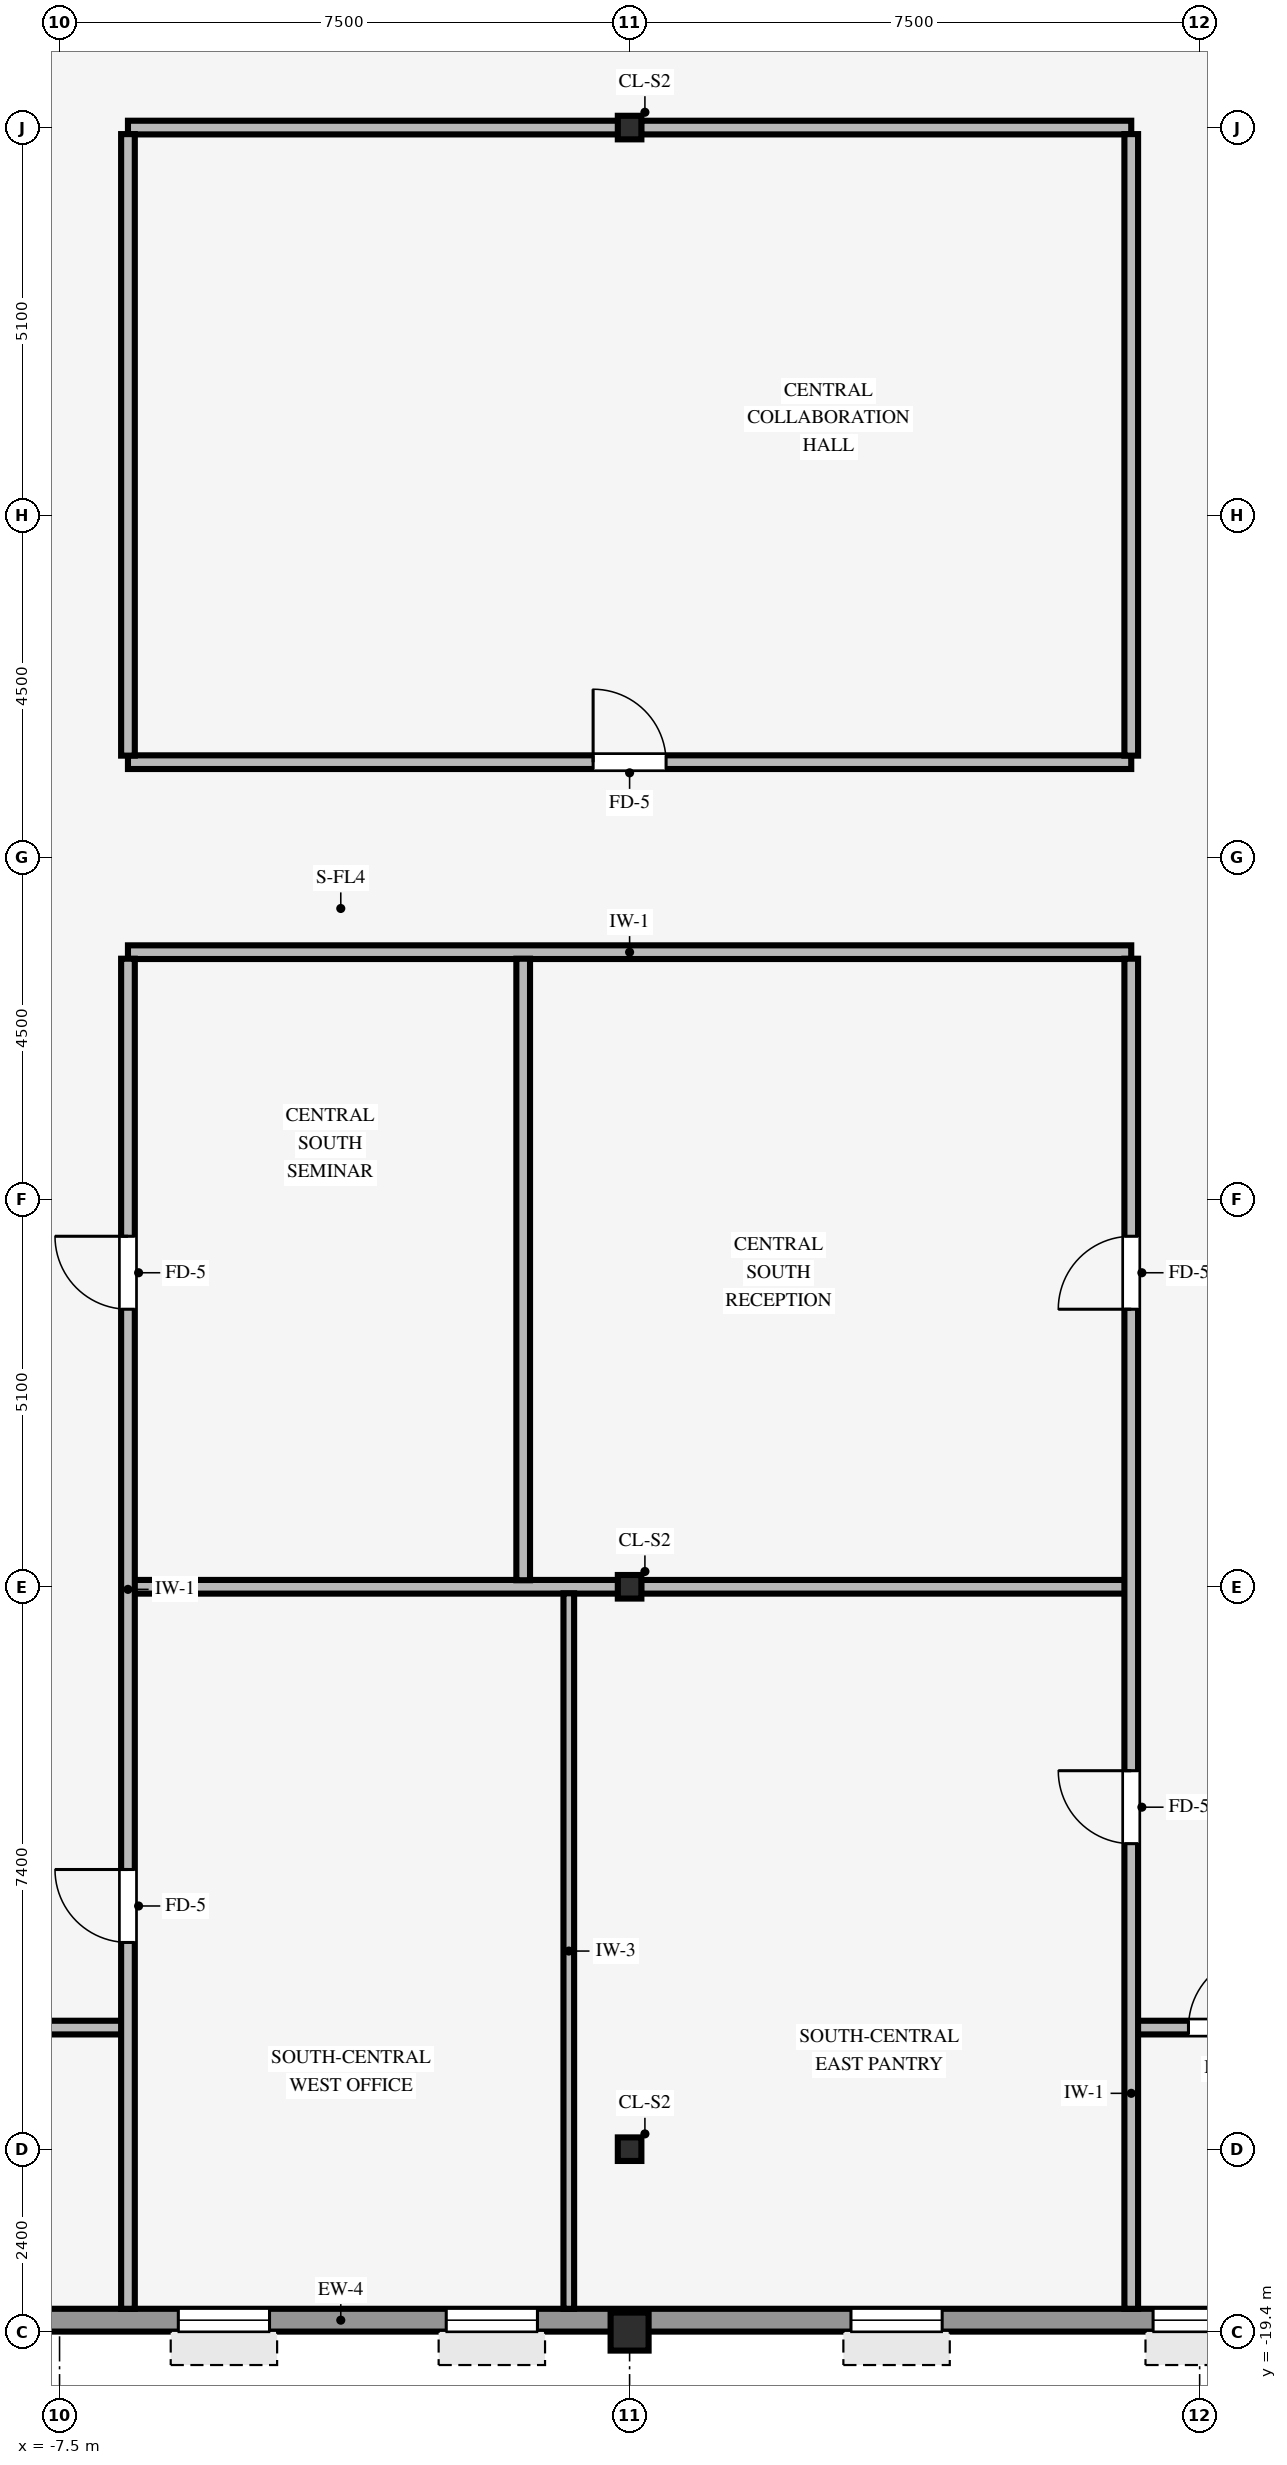
"""IFC4 building model, lengths in metres.
Left out: names, types, materials, properties, quantities, classifications, styles, units other than length and angle.
Written with IfcOpenShell. Run it as: python <this file> out.ifc"""

import sys

from ifc_helpers import new_model, si_unit, direction, frame, frame_2d, origin, origin_2d, place, context, subcontext, project, spatial, rectangle, hollow_rectangle, i_section, extrude, source, transform, mapped, element, fill, save


model = new_model("IFC4")
c1 = context("Model", 3, precision=1e-05, world=origin(), true_north=direction((0.0, 1.0)))
c2 = subcontext(c1, "Body", "Model", "MODEL_VIEW")
j1 = project(units=[si_unit("LENGTHUNIT", "METRE"), si_unit("PLANEANGLEUNIT", "RADIAN")], contexts=[c1])
p1 = place(None, origin())
s1 = spatial("IfcSite", under=j1, at=p1, CompositionType="ELEMENT")
p2 = place(p1, origin())
s2 = spatial("IfcBuilding", under=s1, at=p2, CompositionType="ELEMENT")
p3 = place(p2, frame((0.0, 0.0, 242.0)))
s3 = spatial("IfcBuildingStorey", under=s2, at=p3, CompositionType="ELEMENT", Elevation=242.0)
p4 = place(p3, frame((0.0, -19.4, 0.0), z_axis=(0.0, 0.0, 1.0), x_axis=(1.0, 0.0, 0.0)))
e1 = element("IfcColumn", 1, at=p4, inside=s3, PredefinedType="COLUMN", context=c2, shape_type="SweptSolid", body=[
    extrude(hollow_rectangle(XDim=0.5, YDim=0.5, WallThickness=0.032, InnerFilletRadius=0.032, OuterFilletRadius=0.064, at=origin_2d()), origin(), (0.0, 0.0, 1.0), 3.25),
])
for number, where, z_axis, x_axis in (
    (2, (0.0, -17.0, 0.0), (0.0, 0.0, 1.0), (1.0, 0.0, 0.0)),
    (3, (0.0, -9.6, 0.0), (0.0, 0.0, 1.0), (1.0, 0.0, 0.0)),
    (4, (0.0, 9.6, 0.0), (0.0, 0.0, 1.0), (1.0, 0.0, 0.0)),
):
    element("IfcColumn", number, at=place(p3, frame(where, z_axis=z_axis, x_axis=x_axis)), inside=s3, PredefinedType="COLUMN", context=c2, shape_type="SweptSolid", body=[
        extrude(i_section(OverallWidth=0.31, OverallDepth=0.31, WebThickness=0.015, FlangeThickness=0.015, FilletRadius=0.015, at=origin_2d()), origin(), (0.0, 0.0, 1.0), 3.25),
    ])
p5 = place(p3, frame((-24.3, -19.25, 0.0), z_axis=(0.0, 0.0, 1.0), x_axis=(1.0, 0.0, 0.0)))
e5 = element("IfcWall", 5, at=p5, inside=s3, PredefinedType="STANDARD", context=c2, shape_type="SweptSolid", body=[
    extrude(rectangle(XDim=41.0, YDim=0.3, at=frame_2d((20.5, 0.0))), origin(), (0.0, 0.0, 1.0), 2.585),
])
p6 = place(p5, frame((2.837, 0.0, 0.8)))
e6 = element("IfcOpeningElement", 6, at=p6, cuts=e5, PredefinedType="OPENING", context=c2, shape_type="SweptSolid", body=[
    extrude(rectangle(XDim=1.2, YDim=1.48, at=frame_2d((0.6, 0.74))), frame((0.0, 0.16, 0.0), z_axis=(0.0, -1.0, 0.0), x_axis=(1.0, 0.0, 0.0)), (0.0, 0.0, 1.0), 0.32),
])
p7 = place(p5, frame((7.712, 0.0, 0.8)))
e7 = element("IfcOpeningElement", 7, at=p7, cuts=e5, PredefinedType="OPENING", context=c2, shape_type="SweptSolid", body=[
    extrude(rectangle(XDim=1.2, YDim=1.48, at=frame_2d((0.6, 0.74))), frame((0.0, 0.16, 0.0), z_axis=(0.0, -1.0, 0.0), x_axis=(1.0, 0.0, 0.0)), (0.0, 0.0, 1.0), 0.32),
])
p8 = place(p5, frame((12.587, 0.0, 0.8)))
e8 = element("IfcOpeningElement", 8, at=p8, cuts=e5, PredefinedType="OPENING", context=c2, shape_type="SweptSolid", body=[
    extrude(rectangle(XDim=1.2, YDim=1.48, at=frame_2d((0.6, 0.74))), frame((0.0, 0.16, 0.0), z_axis=(0.0, -1.0, 0.0), x_axis=(1.0, 0.0, 0.0)), (0.0, 0.0, 1.0), 0.32),
])
p9 = place(p5, frame((18.363, 0.0, 0.8)))
e9 = element("IfcOpeningElement", 9, at=p9, cuts=e5, PredefinedType="OPENING", context=c2, shape_type="SweptSolid", body=[
    extrude(rectangle(XDim=1.2, YDim=1.48, at=frame_2d((0.6, 0.74))), frame((0.0, 0.16, 0.0), z_axis=(0.0, -1.0, 0.0), x_axis=(1.0, 0.0, 0.0)), (0.0, 0.0, 1.0), 0.32),
])
p10 = place(p5, frame((21.887, 0.0, 0.8)))
e10 = element("IfcOpeningElement", 10, at=p10, cuts=e5, PredefinedType="OPENING", context=c2, shape_type="SweptSolid", body=[
    extrude(rectangle(XDim=1.2, YDim=1.48, at=frame_2d((0.6, 0.74))), frame((0.0, 0.16, 0.0), z_axis=(0.0, -1.0, 0.0), x_axis=(1.0, 0.0, 0.0)), (0.0, 0.0, 1.0), 0.32),
])
p11 = place(p5, frame((27.212, 0.0, 0.8)))
e11 = element("IfcOpeningElement", 11, at=p11, cuts=e5, PredefinedType="OPENING", context=c2, shape_type="SweptSolid", body=[
    extrude(rectangle(XDim=1.2, YDim=1.48, at=frame_2d((0.6, 0.74))), frame((0.0, 0.16, 0.0), z_axis=(0.0, -1.0, 0.0), x_axis=(1.0, 0.0, 0.0)), (0.0, 0.0, 1.0), 0.32),
])
p12 = place(p5, frame((31.188, 0.0, 0.8)))
e12 = element("IfcOpeningElement", 12, at=p12, cuts=e5, PredefinedType="OPENING", context=c2, shape_type="SweptSolid", body=[
    extrude(rectangle(XDim=1.2, YDim=1.48, at=frame_2d((0.6, 0.74))), frame((0.0, 0.16, 0.0), z_axis=(0.0, -1.0, 0.0), x_axis=(1.0, 0.0, 0.0)), (0.0, 0.0, 1.0), 0.32),
])
p13 = place(p5, frame((36.962, 0.0, 0.8)))
e13 = element("IfcOpeningElement", 13, at=p13, cuts=e5, PredefinedType="OPENING", context=c2, shape_type="SweptSolid", body=[
    extrude(rectangle(XDim=1.2, YDim=1.48, at=frame_2d((0.6, 0.74))), frame((0.0, 0.16, 0.0), z_axis=(0.0, -1.0, 0.0), x_axis=(1.0, 0.0, 0.0)), (0.0, 0.0, 1.0), 0.32),
])
p14 = place(p3, frame((-9.0, -15.4, 0.0), z_axis=(0.0, 0.0, 1.0), x_axis=(1.0, 0.0, 0.0)))
e14 = element("IfcWall", 14, at=p14, inside=s3, PredefinedType="PARTITIONING", context=c2, shape_type="SweptSolid", body=[
    extrude(rectangle(XDim=2.339, YDim=0.18, at=frame_2d((1.169, 0.0))), origin(), (0.0, 0.0, 1.0), 3.24),
])
p15 = place(p3, frame((6.666, -15.4, 0.0), z_axis=(0.0, 0.0, 1.0), x_axis=(1.0, 0.0, 0.0)))
e15 = element("IfcWall", 15, at=p15, inside=s3, PredefinedType="PARTITIONING", context=c2, shape_type="SweptSolid", body=[
    extrude(rectangle(XDim=11.834, YDim=0.18, at=frame_2d((5.917, 0.0))), origin(), (0.0, 0.0, 1.0), 3.24),
])
p16 = place(p15, frame((0.687, 0.0, 0.0)))
e16 = element("IfcOpeningElement", 16, at=p16, cuts=e15, PredefinedType="OPENING", context=c2, shape_type="SweptSolid", body=[
    extrude(rectangle(XDim=0.96, YDim=2.1, at=frame_2d((0.48, 1.05))), frame((0.0, 0.1, 0.0), z_axis=(0.0, -1.0, 0.0), x_axis=(1.0, 0.0, 0.0)), (0.0, 0.0, 1.0), 0.2),
])
p17 = place(p3, frame((-6.539, -9.6, 0.0), z_axis=(0.0, 0.0, 1.0), x_axis=(1.0, 0.0, 0.0)))
e17 = element("IfcWall", 17, at=p17, inside=s3, PredefinedType="PARTITIONING", context=c2, shape_type="SweptSolid", body=[
    extrude(rectangle(XDim=6.388, YDim=0.18, at=frame_2d((3.194, 0.0))), origin(), (0.0, 0.0, 1.0), 2.285),
])
p18 = place(p3, frame((0.151, -9.6, 0.0), z_axis=(0.0, 0.0, 1.0), x_axis=(1.0, 0.0, 0.0)))
e18 = element("IfcWall", 18, at=p18, inside=s3, PredefinedType="PARTITIONING", context=c2, shape_type="SweptSolid", body=[
    extrude(rectangle(XDim=6.383, YDim=0.18, at=frame_2d((3.191, 0.0))), origin(), (0.0, 0.0, 1.0), 2.285),
])
p19 = place(p3, frame((-6.6, -1.25, 0.0), z_axis=(0.0, 0.0, 1.0), x_axis=(1.0, 0.0, 0.0)))
e19 = element("IfcWall", 19, at=p19, inside=s3, PredefinedType="PARTITIONING", context=c2, shape_type="SweptSolid", body=[
    extrude(rectangle(XDim=13.2, YDim=0.18, at=frame_2d((6.6, 0.0))), origin(), (0.0, 0.0, 1.0), 3.24),
])
p20 = place(p3, frame((-6.6, 1.25, 0.0), z_axis=(0.0, 0.0, 1.0), x_axis=(1.0, 0.0, 0.0)))
e20 = element("IfcWall", 20, at=p20, inside=s3, PredefinedType="PARTITIONING", context=c2, shape_type="SweptSolid", body=[
    extrude(rectangle(XDim=13.2, YDim=0.18, at=frame_2d((6.6, 0.0))), origin(), (0.0, 0.0, 1.0), 3.24),
])
p21 = place(p20, frame((6.12, 0.0, 0.0)))
e21 = element("IfcOpeningElement", 21, at=p21, cuts=e20, PredefinedType="OPENING", context=c2, shape_type="SweptSolid", body=[
    extrude(rectangle(XDim=0.96, YDim=2.1, at=frame_2d((0.48, 1.05))), frame((0.0, 0.1, 0.0), z_axis=(0.0, -1.0, 0.0), x_axis=(1.0, 0.0, 0.0)), (0.0, 0.0, 1.0), 0.2),
])
for number, where, z_axis, x_axis in (
    (22, (-6.6, 9.6, 0.0), (0.0, 0.0, 1.0), (1.0, 0.0, 0.0)),
    (23, (0.151, 9.6, 0.0), (0.0, 0.0, 1.0), (1.0, 0.0, 0.0)),
):
    element("IfcWall", number, at=place(p3, frame(where, z_axis=z_axis, x_axis=x_axis)), inside=s3, PredefinedType="PARTITIONING", context=c2, shape_type="SweptSolid", body=[
        extrude(rectangle(XDim=6.449, YDim=0.18, at=frame_2d((3.225, 0.0))), origin(), (0.0, 0.0, 1.0), 2.285),
    ])
p22 = place(p3, frame((-6.6, -19.1, 0.0), z_axis=(0.0, 0.0, 1.0), x_axis=(0.0, 1.0, 0.0)))
e24 = element("IfcWall", 24, at=p22, inside=s3, PredefinedType="PARTITIONING", context=c2, shape_type="SweptSolid", body=[
    extrude(rectangle(XDim=17.764, YDim=0.18, at=frame_2d((8.882, 0.0))), origin(), (0.0, 0.0, 1.0), 3.24),
])
p23 = place(p22, frame((13.152, 0.0, 0.0)))
e25 = element("IfcOpeningElement", 25, at=p23, cuts=e24, PredefinedType="OPENING", context=c2, shape_type="SweptSolid", body=[
    extrude(rectangle(XDim=0.96, YDim=2.1, at=frame_2d((0.48, 1.05))), frame((0.0, 0.1, 0.0), z_axis=(0.0, -1.0, 0.0), x_axis=(1.0, 0.0, 0.0)), (0.0, 0.0, 1.0), 0.2),
])
p24 = place(p22, frame((4.82, 0.0, 0.0)))
e26 = element("IfcOpeningElement", 26, at=p24, cuts=e24, PredefinedType="OPENING", context=c2, shape_type="SweptSolid", body=[
    extrude(rectangle(XDim=0.96, YDim=2.1, at=frame_2d((0.48, 1.05))), frame((0.0, 0.1, 0.0), z_axis=(0.0, -1.0, 0.0), x_axis=(1.0, 0.0, 0.0)), (0.0, 0.0, 1.0), 0.2),
])
for number, where, z_axis, x_axis in (
    (27, (-6.6, 1.336, 0.0), (0.0, 0.0, 1.0), (0.0, 1.0, 0.0)),
    (28, (-1.4, -9.514, 0.0), (0.0, 0.0, 1.0), (0.0, 1.0, 0.0)),
):
    element("IfcWall", number, at=place(p3, frame(where, z_axis=z_axis, x_axis=x_axis)), inside=s3, PredefinedType="PARTITIONING", context=c2, shape_type="SweptSolid", body=[
        extrude(rectangle(XDim=8.178, YDim=0.18, at=frame_2d((4.089, 0.0))), origin(), (0.0, 0.0, 1.0), 3.24),
    ])
p25 = place(p3, frame((-0.8, -19.1, 0.0), z_axis=(0.0, 0.0, 1.0), x_axis=(0.0, 1.0, 0.0)))
e29 = element("IfcWall", 29, at=p25, inside=s3, PredefinedType="PARTITIONING", context=c2, shape_type="SweptSolid", body=[
    extrude(rectangle(XDim=9.414, YDim=0.14, at=frame_2d((4.707, 0.0))), origin(), (0.0, 0.0, 1.0), 3.24),
])
p26 = place(p3, frame((6.6, -19.1, 0.0), z_axis=(0.0, 0.0, 1.0), x_axis=(0.0, 1.0, 0.0)))
e30 = element("IfcWall", 30, at=p26, inside=s3, PredefinedType="PARTITIONING", context=c2, shape_type="SweptSolid", body=[
    extrude(rectangle(XDim=17.764, YDim=0.18, at=frame_2d((8.882, 0.0))), origin(), (0.0, 0.0, 1.0), 3.24),
])
p27 = place(p26, frame((13.152, 0.0, 0.0)))
e31 = element("IfcOpeningElement", 31, at=p27, cuts=e30, PredefinedType="OPENING", context=c2, shape_type="SweptSolid", body=[
    extrude(rectangle(XDim=0.96, YDim=2.1, at=frame_2d((0.48, 1.05))), frame((0.0, 0.1, 0.0), z_axis=(0.0, -1.0, 0.0), x_axis=(1.0, 0.0, 0.0)), (0.0, 0.0, 1.0), 0.2),
])
p28 = place(p26, frame((6.12, 0.0, 0.0)))
e32 = element("IfcOpeningElement", 32, at=p28, cuts=e30, PredefinedType="OPENING", context=c2, shape_type="SweptSolid", body=[
    extrude(rectangle(XDim=0.96, YDim=2.1, at=frame_2d((0.48, 1.05))), frame((0.0, 0.1, 0.0), z_axis=(0.0, -1.0, 0.0), x_axis=(1.0, 0.0, 0.0)), (0.0, 0.0, 1.0), 0.2),
])
p29 = place(p3, frame((6.6, 1.336, 0.0), z_axis=(0.0, 0.0, 1.0), x_axis=(0.0, 1.0, 0.0)))
e33 = element("IfcWall", 33, at=p29, inside=s3, PredefinedType="PARTITIONING", context=c2, shape_type="SweptSolid", body=[
    extrude(rectangle(XDim=8.178, YDim=0.18, at=frame_2d((4.089, 0.0))), origin(), (0.0, 0.0, 1.0), 3.24),
])
m1 = source(origin(), c2, "Body", "SweptSolid", [
    extrude(rectangle(XDim=1.2, YDim=1.48, at=frame_2d((0.6, 0.74))), frame((0.0, 0.03, 0.0), z_axis=(0.0, -1.0, 0.0), x_axis=(1.0, 0.0, 0.0)), (0.0, 0.0, 1.0), 0.06),
])
p30 = place(p9, origin())
e34 = element("IfcWindow", 34, at=p30, inside=s3, PartitioningType="SINGLE_PANEL", PredefinedType="WINDOW", context=c2, shape_type="MappedRepresentation", body=[
    mapped(m1, transform((0.0, 0.0, 0.0), scale=1.0)),
])
fill(e9, e34)
p31 = place(p10, origin())
e35 = element("IfcWindow", 35, at=p31, inside=s3, PartitioningType="SINGLE_PANEL", PredefinedType="WINDOW", context=c2, shape_type="MappedRepresentation", body=[
    mapped(m1, transform((0.0, 0.0, 0.0), scale=1.0)),
])
fill(e10, e35)
p32 = place(p11, origin())
e36 = element("IfcWindow", 36, at=p32, inside=s3, PartitioningType="SINGLE_PANEL", PredefinedType="WINDOW", context=c2, shape_type="MappedRepresentation", body=[
    mapped(m1, transform((0.0, 0.0, 0.0), scale=1.0)),
])
fill(e11, e36)
p33 = place(p12, origin())
e37 = element("IfcWindow", 37, at=p33, inside=s3, PartitioningType="SINGLE_PANEL", PredefinedType="WINDOW", context=c2, shape_type="MappedRepresentation", body=[
    mapped(m1, transform((0.0, 0.0, 0.0), scale=1.0)),
])
fill(e12, e37)
m2 = source(origin(), c2, "Body", "SweptSolid", [
    extrude(rectangle(XDim=0.96, YDim=2.1, at=frame_2d((0.48, 1.05))), frame((0.0, 0.025, 0.0), z_axis=(0.0, -1.0, 0.0), x_axis=(1.0, 0.0, 0.0)), (0.0, 0.0, 1.0), 0.05),
])
p34 = place(p21, origin())
e38 = element("IfcDoor", 38, at=p34, inside=s3, OperationType="SINGLE_SWING_LEFT", PredefinedType="DOOR", context=c2, shape_type="MappedRepresentation", body=[
    mapped(m2, transform((0.0, 0.0, 0.0), scale=1.0)),
])
fill(e21, e38)
p35 = place(p23, origin())
e39 = element("IfcDoor", 39, at=p35, inside=s3, OperationType="SINGLE_SWING_RIGHT", PredefinedType="DOOR", context=c2, shape_type="MappedRepresentation", body=[
    mapped(m2, transform((0.0, 0.0, 0.0), scale=1.0)),
])
fill(e25, e39)
p36 = place(p27, origin())
e40 = element("IfcDoor", 40, at=p36, inside=s3, OperationType="SINGLE_SWING_LEFT", PredefinedType="DOOR", context=c2, shape_type="MappedRepresentation", body=[
    mapped(m2, transform((0.0, 0.0, 0.0), scale=1.0)),
])
fill(e31, e40)
p37 = place(p28, origin())
e41 = element("IfcDoor", 41, at=p37, inside=s3, OperationType="SINGLE_SWING_RIGHT", PredefinedType="DOOR", context=c2, shape_type="MappedRepresentation", body=[
    mapped(m2, transform((0.0, 0.0, 0.0), scale=1.0)),
])
fill(e32, e41)
p38 = place(p24, origin())
e42 = element("IfcDoor", 42, at=p38, inside=s3, OperationType="SINGLE_SWING_RIGHT", PredefinedType="DOOR", context=c2, shape_type="MappedRepresentation", body=[
    mapped(m2, transform((0.0, 0.0, 0.0), scale=1.0)),
])
fill(e26, e42)
p39 = place(p16, origin())
e43 = element("IfcDoor", 43, at=p39, inside=s3, OperationType="SINGLE_SWING_RIGHT", PredefinedType="DOOR", context=c2, shape_type="MappedRepresentation", body=[
    mapped(m2, transform((0.0, 0.0, 0.0), scale=1.0)),
])
fill(e16, e43)
save(model, sys.argv[1])
